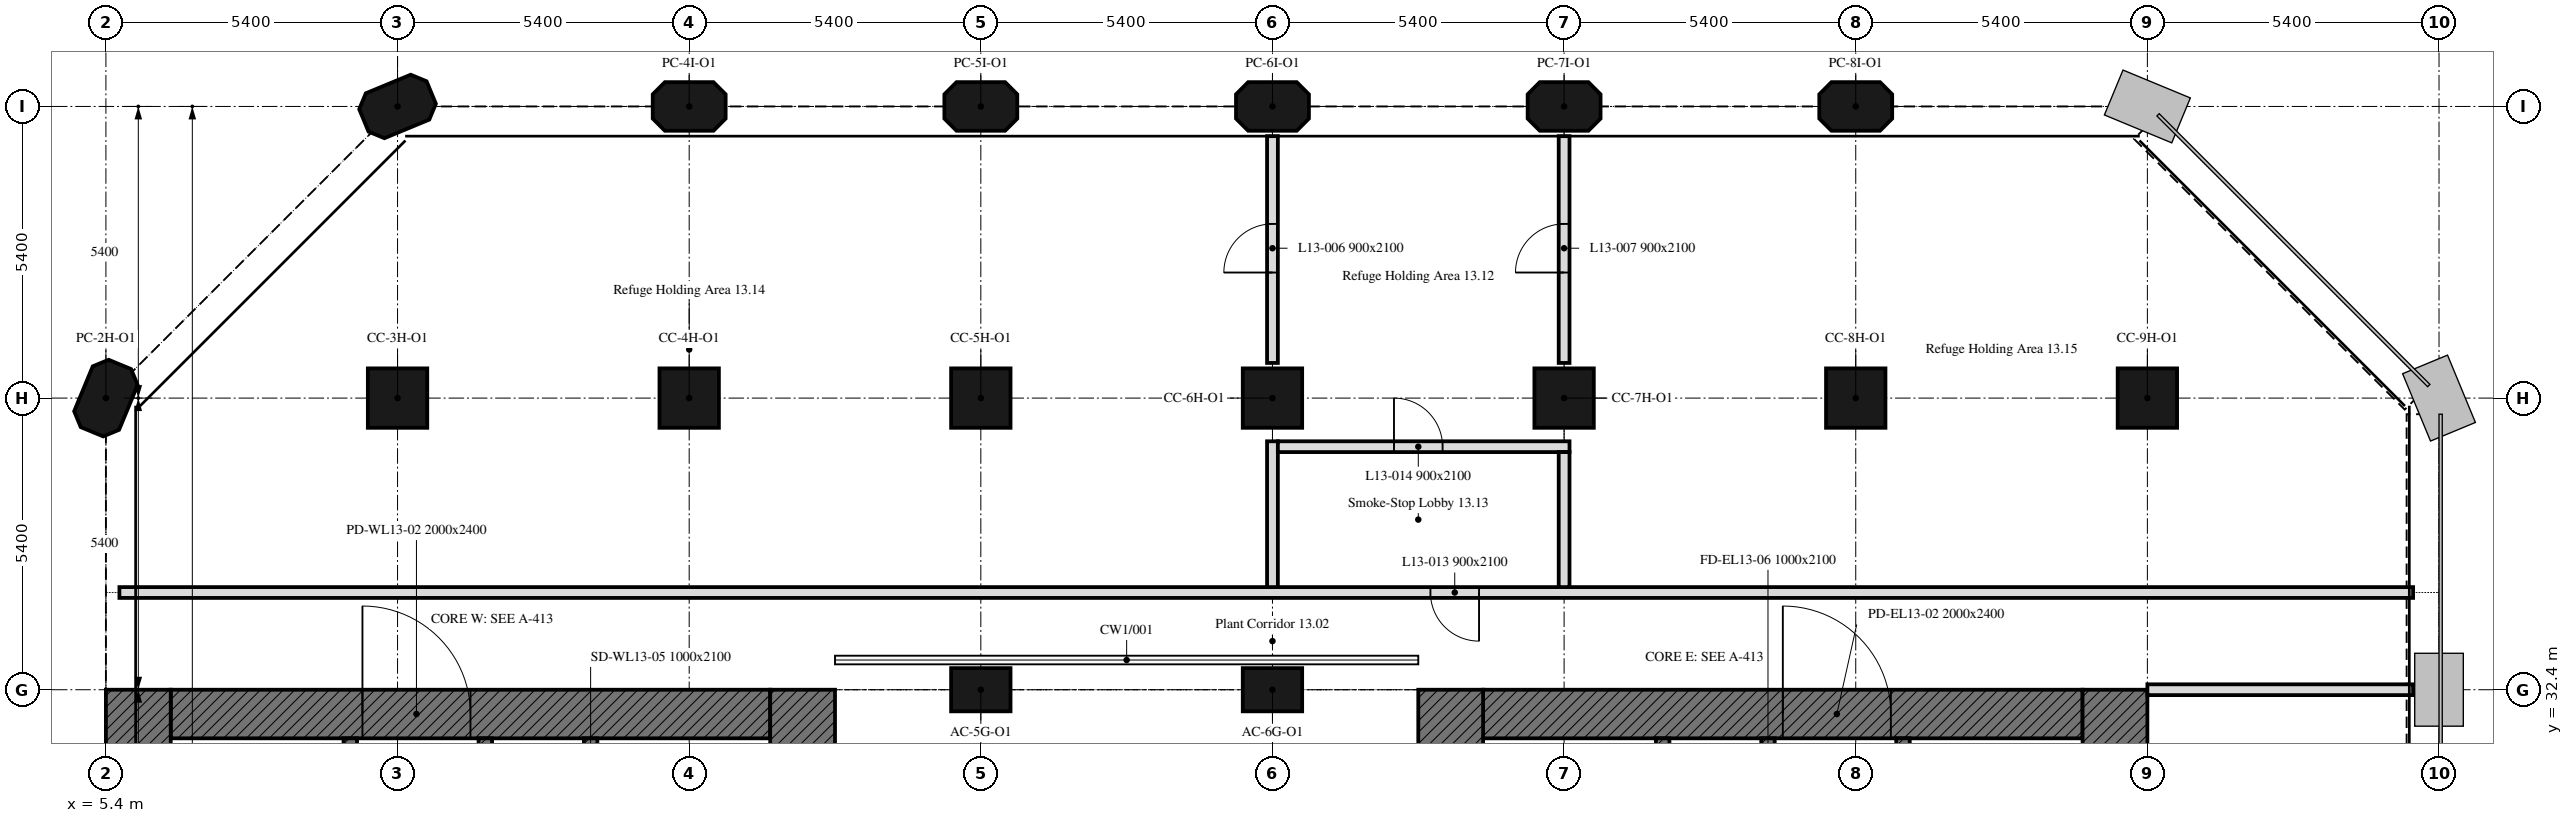
"""IFC4 building model, lengths in metres.
Left out: names, types, materials, properties, quantities, classifications, styles, units other than length and angle.
Written with IfcOpenShell. Run it as: python <this file> out.ifc"""

import sys

from ifc_helpers import new_model, si_unit, direction, frame, frame_2d, origin, origin_2d, place, context, subcontext, project, spatial, polyline, rectangle, outline, extrude, element, fill, save


model = new_model("IFC4")
c1 = context("Model", 3, precision=1e-05, world=origin(), true_north=direction((0.0, 1.0)))
c2 = subcontext(c1, "Body", "Model", "MODEL_VIEW")
j1 = project(units=[si_unit("LENGTHUNIT", "METRE"), si_unit("PLANEANGLEUNIT", "RADIAN")], contexts=[c1])
p1 = place(None, origin())
s1 = spatial("IfcSite", under=j1, at=p1, CompositionType="ELEMENT")
p2 = place(p1, origin())
s2 = spatial("IfcBuilding", under=s1, at=p2, CompositionType="ELEMENT")
p3 = place(p2, frame((0.0, 0.0, 60.2)))
s3 = spatial("IfcBuildingStorey", under=s2, at=p3, CompositionType="ELEMENT", Elevation=60.2)
for number, where, z_axis, x_axis in (
    (1, (21.6, 32.4, 0.0), (0.0, 0.0, 1.0), (1.0, 0.0, 0.0)),
    (2, (27.0, 32.4, 0.0), (0.0, 0.0, 1.0), (1.0, 0.0, 0.0)),
):
    element("IfcColumn", number, at=place(p3, frame(where, z_axis=z_axis, x_axis=x_axis)), inside=s3, PredefinedType="COLUMN", context=c2, shape_type="SweptSolid", body=[
        extrude(rectangle(XDim=1.1, YDim=0.8, at=origin_2d()), origin(), (0.0, 0.0, 1.0), 4.5),
    ])
p4 = place(p3, frame((5.4, 37.8, 0.0), z_axis=(0.0, 0.0, 1.0), x_axis=(0.382683432365, 0.923879532511, 0.0)))
e3 = element("IfcColumn", 3, at=p4, inside=s3, PredefinedType="COLUMN", context=c2, shape_type="SweptSolid", body=[
    extrude(outline(polyline([(-0.45, -0.45), (0.45, -0.45), (0.675, -0.225), (0.675, 0.225), (0.45, 0.45), (-0.45, 0.45), (-0.675, 0.225), (-0.675, -0.225), (-0.45, -0.45)])), origin(), (0.0, 0.0, 1.0), 4.5),
])
for number, where, z_axis, x_axis in (
    (4, (10.8, 37.8, 0.0), (0.0, 0.0, 1.0), (1.0, 0.0, 0.0)),
    (5, (16.2, 37.8, 0.0), (0.0, 0.0, 1.0), (1.0, 0.0, 0.0)),
    (6, (21.6, 37.8, 0.0), (0.0, 0.0, 1.0), (1.0, 0.0, 0.0)),
    (7, (27.0, 37.8, 0.0), (0.0, 0.0, 1.0), (1.0, 0.0, 0.0)),
    (8, (32.4, 37.8, 0.0), (0.0, 0.0, 1.0), (1.0, 0.0, 0.0)),
    (9, (37.8, 37.8, 0.0), (0.0, 0.0, 1.0), (1.0, 0.0, 0.0)),
    (10, (43.2, 37.8, 0.0), (0.0, 0.0, 1.0), (1.0, 0.0, 0.0)),
):
    element("IfcColumn", number, at=place(p3, frame(where, z_axis=z_axis, x_axis=x_axis)), inside=s3, PredefinedType="COLUMN", context=c2, shape_type="SweptSolid", body=[
        extrude(rectangle(XDim=1.1, YDim=1.1, at=origin_2d()), origin(), (0.0, 0.0, 1.0), 4.5),
    ])
for number, where, z_axis, x_axis in (
    (11, (10.8, 43.2, 0.0), (0.0, 0.0, 1.0), (0.924, 0.383, 0.0)),
    (12, (16.2, 43.2, 0.0), (0.0, 0.0, 1.0), (1.0, 0.0, 0.0)),
    (13, (21.6, 43.2, 0.0), (0.0, 0.0, 1.0), (1.0, 0.0, 0.0)),
    (14, (27.0, 43.2, 0.0), (0.0, 0.0, 1.0), (1.0, 0.0, 0.0)),
    (15, (32.4, 43.2, 0.0), (0.0, 0.0, 1.0), (1.0, 0.0, 0.0)),
    (16, (37.8, 43.2, 0.0), (0.0, 0.0, 1.0), (1.0, 0.0, 0.0)),
):
    element("IfcColumn", number, at=place(p3, frame(where, z_axis=z_axis, x_axis=x_axis)), inside=s3, PredefinedType="COLUMN", context=c2, shape_type="SweptSolid", body=[
        extrude(outline(polyline([(-0.45, -0.45), (0.45, -0.45), (0.675, -0.225), (0.675, 0.225), (0.45, 0.45), (-0.45, 0.45), (-0.675, 0.225), (-0.675, -0.225), (-0.45, -0.45)])), origin(), (0.0, 0.0, 1.0), 4.5),
    ])
p5 = place(p3, frame((6.6, 31.95, 0.0), z_axis=(0.0, 0.0, 1.0), x_axis=(1.0, 0.0, 0.0)))
e17 = element("IfcWall", 17, at=p5, inside=s3, PredefinedType="SOLIDWALL", context=c2, shape_type="SweptSolid", body=[
    extrude(rectangle(XDim=11.1, YDim=0.9, at=frame_2d((5.55, 0.0))), origin(), (0.0, 0.0, 1.0), 4.5),
])
p6 = place(p5, frame((3.55, 0.0, 0.0)))
e18 = element("IfcOpeningElement", 18, at=p6, cuts=e17, PredefinedType="OPENING", context=c2, shape_type="SweptSolid", body=[
    extrude(rectangle(XDim=2.0, YDim=2.4, at=frame_2d((1.0, 1.2))), frame((0.0, 0.45, 0.0), z_axis=(0.0, -1.0, 0.0), x_axis=(1.0, 0.0, 0.0)), (0.0, 0.0, 1.0), 0.9),
])
for number, where, z_axis, x_axis in (
    (19, (6.0, 16.2, 0.0), (0.0, 0.0, 1.0), (0.0, 1.0, 0.0)),
    (20, (18.3, 32.4, 0.0), (0.0, 0.0, 1.0), (0.0, -1.0, 0.0)),
):
    element("IfcWall", number, at=place(p3, frame(where, z_axis=z_axis, x_axis=x_axis)), inside=s3, PredefinedType="SOLIDWALL", context=c2, shape_type="SweptSolid", body=[
        extrude(rectangle(XDim=16.2, YDim=1.2, at=frame_2d((8.1, 0.0))), origin(), (0.0, 0.0, 1.0), 4.5),
    ])
p7 = place(p3, frame((9.925, 17.1, 0.0), z_axis=(0.0, 0.0, 1.0), x_axis=(0.0, 1.0, 0.0)))
e21 = element("IfcWall", 21, at=p7, inside=s3, PredefinedType="SOLIDWALL", context=c2, shape_type="SweptSolid", body=[
    extrude(rectangle(XDim=14.4, YDim=0.25, at=frame_2d((7.2, 0.0))), origin(), (0.0, 0.0, 1.0), 4.5),
])
p8 = place(p7, frame((4.6, 0.0, 0.0)))
e22 = element("IfcOpeningElement", 22, at=p8, cuts=e21, PredefinedType="OPENING", context=c2, shape_type="SweptSolid", body=[
    extrude(rectangle(XDim=1.0, YDim=2.1, at=frame_2d((0.5, 1.05))), frame((0.0, 0.125, 0.0), z_axis=(0.0, -1.0, 0.0), x_axis=(1.0, 0.0, 0.0)), (0.0, 0.0, 1.0), 0.25),
])
p9 = place(p7, frame((7.062, 0.0, 0.0)))
e23 = element("IfcOpeningElement", 23, at=p9, cuts=e21, PredefinedType="OPENING", context=c2, shape_type="SweptSolid", body=[
    extrude(rectangle(XDim=1.2, YDim=2.1, at=frame_2d((0.6, 1.05))), frame((0.0, 0.125, 0.0), z_axis=(0.0, -1.0, 0.0), x_axis=(1.0, 0.0, 0.0)), (0.0, 0.0, 1.0), 0.25),
])
p10 = place(p3, frame((14.375, 17.1, 0.0), z_axis=(0.0, 0.0, 1.0), x_axis=(0.0, 1.0, 0.0)))
e24 = element("IfcWall", 24, at=p10, inside=s3, PredefinedType="SOLIDWALL", context=c2, shape_type="SweptSolid", body=[
    extrude(rectangle(XDim=14.4, YDim=0.25, at=frame_2d((7.2, 0.0))), origin(), (0.0, 0.0, 1.0), 4.5),
])
p11 = place(p10, frame((13.15, 0.0, 0.0)))
e25 = element("IfcOpeningElement", 25, at=p11, cuts=e24, PredefinedType="OPENING", context=c2, shape_type="SweptSolid", body=[
    extrude(rectangle(XDim=1.0, YDim=2.1, at=frame_2d((0.5, 1.05))), frame((0.0, 0.125, 0.0), z_axis=(0.0, -1.0, 0.0), x_axis=(1.0, 0.0, 0.0)), (0.0, 0.0, 1.0), 0.25),
])
p12 = place(p10, frame((0.846, 0.0, 0.0)))
e26 = element("IfcOpeningElement", 26, at=p12, cuts=e24, PredefinedType="OPENING", context=c2, shape_type="SweptSolid", body=[
    extrude(rectangle(XDim=0.9, YDim=2.1, at=frame_2d((0.45, 1.05))), frame((0.0, 0.125, 0.0), z_axis=(0.0, -1.0, 0.0), x_axis=(1.0, 0.0, 0.0)), (0.0, 0.0, 1.0), 0.25),
])
p13 = place(p10, frame((3.346, 0.0, 0.0)))
e27 = element("IfcOpeningElement", 27, at=p13, cuts=e24, PredefinedType="OPENING", context=c2, shape_type="SweptSolid", body=[
    extrude(rectangle(XDim=0.9, YDim=2.1, at=frame_2d((0.45, 1.05))), frame((0.0, 0.125, 0.0), z_axis=(0.0, -1.0, 0.0), x_axis=(1.0, 0.0, 0.0)), (0.0, 0.0, 1.0), 0.25),
])
p14 = place(p3, frame((12.425, 29.4, 0.0), z_axis=(0.0, 0.0, 1.0), x_axis=(0.0, 1.0, 0.0)))
e28 = element("IfcWall", 28, at=p14, inside=s3, PredefinedType="SOLIDWALL", context=c2, shape_type="SweptSolid", body=[
    extrude(rectangle(XDim=2.1, YDim=0.25, at=frame_2d((1.05, 0.0))), origin(), (0.0, 0.0, 1.0), 4.5),
])
p15 = place(p14, frame((0.5, 0.0, 0.0)))
e29 = element("IfcOpeningElement", 29, at=p15, cuts=e28, PredefinedType="OPENING", context=c2, shape_type="SweptSolid", body=[
    extrude(rectangle(XDim=1.0, YDim=2.1, at=frame_2d((0.5, 1.05))), frame((0.0, 0.125, 0.0), z_axis=(0.0, -1.0, 0.0), x_axis=(1.0, 0.0, 0.0)), (0.0, 0.0, 1.0), 0.25),
])
p16 = place(p3, frame((30.9, 31.95, 0.0), z_axis=(0.0, 0.0, 1.0), x_axis=(1.0, 0.0, 0.0)))
e30 = element("IfcWall", 30, at=p16, inside=s3, PredefinedType="SOLIDWALL", context=c2, shape_type="SweptSolid", body=[
    extrude(rectangle(XDim=11.1, YDim=0.9, at=frame_2d((5.55, 0.0))), origin(), (0.0, 0.0, 1.0), 4.5),
])
p17 = place(p16, frame((5.55, 0.0, 0.0)))
e31 = element("IfcOpeningElement", 31, at=p17, cuts=e30, PredefinedType="OPENING", context=c2, shape_type="SweptSolid", body=[
    extrude(rectangle(XDim=2.0, YDim=2.4, at=frame_2d((1.0, 1.2))), frame((0.0, 0.45, 0.0), z_axis=(0.0, -1.0, 0.0), x_axis=(1.0, 0.0, 0.0)), (0.0, 0.0, 1.0), 0.9),
])
for number, where, z_axis, x_axis in (
    (32, (42.6, 32.4, 0.0), (0.0, 0.0, 1.0), (0.0, -1.0, 0.0)),
    (33, (30.3, 16.2, 0.0), (0.0, 0.0, 1.0), (0.0, 1.0, 0.0)),
):
    element("IfcWall", number, at=place(p3, frame(where, z_axis=z_axis, x_axis=x_axis)), inside=s3, PredefinedType="SOLIDWALL", context=c2, shape_type="SweptSolid", body=[
        extrude(rectangle(XDim=16.2, YDim=1.2, at=frame_2d((8.1, 0.0))), origin(), (0.0, 0.0, 1.0), 4.5),
    ])
p18 = place(p3, frame((38.675, 17.1, 0.0), z_axis=(0.0, 0.0, 1.0), x_axis=(0.0, 1.0, 0.0)))
e34 = element("IfcWall", 34, at=p18, inside=s3, PredefinedType="SOLIDWALL", context=c2, shape_type="SweptSolid", body=[
    extrude(rectangle(XDim=14.4, YDim=0.25, at=frame_2d((7.2, 0.0))), origin(), (0.0, 0.0, 1.0), 4.5),
])
p19 = place(p18, frame((4.6, 0.0, 0.0)))
e35 = element("IfcOpeningElement", 35, at=p19, cuts=e34, PredefinedType="OPENING", context=c2, shape_type="SweptSolid", body=[
    extrude(rectangle(XDim=1.0, YDim=2.1, at=frame_2d((0.5, 1.05))), frame((0.0, 0.125, 0.0), z_axis=(0.0, -1.0, 0.0), x_axis=(1.0, 0.0, 0.0)), (0.0, 0.0, 1.0), 0.25),
])
p20 = place(p18, frame((7.062, 0.0, 0.0)))
e36 = element("IfcOpeningElement", 36, at=p20, cuts=e34, PredefinedType="OPENING", context=c2, shape_type="SweptSolid", body=[
    extrude(rectangle(XDim=1.2, YDim=2.1, at=frame_2d((0.6, 1.05))), frame((0.0, 0.125, 0.0), z_axis=(0.0, -1.0, 0.0), x_axis=(1.0, 0.0, 0.0)), (0.0, 0.0, 1.0), 0.25),
])
p21 = place(p3, frame((34.225, 17.1, 0.0), z_axis=(0.0, 0.0, 1.0), x_axis=(0.0, 1.0, 0.0)))
e37 = element("IfcWall", 37, at=p21, inside=s3, PredefinedType="SOLIDWALL", context=c2, shape_type="SweptSolid", body=[
    extrude(rectangle(XDim=14.4, YDim=0.25, at=frame_2d((7.2, 0.0))), origin(), (0.0, 0.0, 1.0), 4.5),
])
p22 = place(p21, frame((13.15, 0.0, 0.0)))
e38 = element("IfcOpeningElement", 38, at=p22, cuts=e37, PredefinedType="OPENING", context=c2, shape_type="SweptSolid", body=[
    extrude(rectangle(XDim=1.0, YDim=2.1, at=frame_2d((0.5, 1.05))), frame((0.0, 0.125, 0.0), z_axis=(0.0, -1.0, 0.0), x_axis=(1.0, 0.0, 0.0)), (0.0, 0.0, 1.0), 0.25),
])
p23 = place(p21, frame((0.846, 0.0, 0.0)))
e39 = element("IfcOpeningElement", 39, at=p23, cuts=e37, PredefinedType="OPENING", context=c2, shape_type="SweptSolid", body=[
    extrude(rectangle(XDim=0.9, YDim=2.1, at=frame_2d((0.45, 1.05))), frame((0.0, 0.125, 0.0), z_axis=(0.0, -1.0, 0.0), x_axis=(1.0, 0.0, 0.0)), (0.0, 0.0, 1.0), 0.25),
])
p24 = place(p21, frame((3.346, 0.0, 0.0)))
e40 = element("IfcOpeningElement", 40, at=p24, cuts=e37, PredefinedType="OPENING", context=c2, shape_type="SweptSolid", body=[
    extrude(rectangle(XDim=0.9, YDim=2.1, at=frame_2d((0.45, 1.05))), frame((0.0, 0.125, 0.0), z_axis=(0.0, -1.0, 0.0), x_axis=(1.0, 0.0, 0.0)), (0.0, 0.0, 1.0), 0.25),
])
p25 = place(p3, frame((36.175, 29.4, 0.0), z_axis=(0.0, 0.0, 1.0), x_axis=(0.0, 1.0, 0.0)))
e41 = element("IfcWall", 41, at=p25, inside=s3, PredefinedType="SOLIDWALL", context=c2, shape_type="SweptSolid", body=[
    extrude(rectangle(XDim=2.1, YDim=0.25, at=frame_2d((1.05, 0.0))), origin(), (0.0, 0.0, 1.0), 4.5),
])
p26 = place(p25, frame((0.5, 0.0, 0.0)))
e42 = element("IfcOpeningElement", 42, at=p26, cuts=e41, PredefinedType="OPENING", context=c2, shape_type="SweptSolid", body=[
    extrude(rectangle(XDim=1.0, YDim=2.1, at=frame_2d((0.5, 1.05))), frame((0.0, 0.125, 0.0), z_axis=(0.0, -1.0, 0.0), x_axis=(1.0, 0.0, 0.0)), (0.0, 0.0, 1.0), 0.25),
])
p27 = place(p3, frame((48.12, 34.2, 0.0), z_axis=(0.0, 0.0, 1.0), x_axis=(-1.0, 0.0, 0.0)))
e43 = element("IfcWall", 43, at=p27, inside=s3, PredefinedType="PARTITIONING", context=c2, shape_type="SweptSolid", body=[
    extrude(rectangle(XDim=42.47, YDim=0.2, at=frame_2d((21.235, 0.0))), origin(), (0.0, 0.0, 1.0), 3.75),
])
p28 = place(p27, frame((17.295, 0.0, 0.0)))
e44 = element("IfcOpeningElement", 44, at=p28, cuts=e43, PredefinedType="OPENING", context=c2, shape_type="SweptSolid", body=[
    extrude(rectangle(XDim=0.9, YDim=2.1, at=frame_2d((0.45, 1.05))), frame((0.0, 0.1, 0.0), z_axis=(0.0, -1.0, 0.0), x_axis=(1.0, 0.0, 0.0)), (0.0, 0.0, 1.0), 0.2),
])
p29 = place(p3, frame((43.2, 32.4, 0.0), z_axis=(0.0, 0.0, 1.0), x_axis=(1.0, 0.0, 0.0)))
e45 = element("IfcWall", 45, at=p29, inside=s3, PredefinedType="PARTITIONING", context=c2, shape_type="SweptSolid", body=[
    extrude(rectangle(XDim=4.92, YDim=0.2, at=frame_2d((2.46, 0.0))), origin(), (0.0, 0.0, 1.0), 3.75),
])
p30 = place(p3, frame((27.0, 34.3, 0.0), z_axis=(0.0, 0.0, 1.0), x_axis=(0.0, 1.0, 0.0)))
e46 = element("IfcWall", 46, at=p30, inside=s3, PredefinedType="PARTITIONING", context=c2, shape_type="SweptSolid", body=[
    extrude(rectangle(XDim=2.7, YDim=0.2, at=frame_2d((1.35, 0.0))), origin(), (0.0, 0.0, 1.0), 3.75),
])
p31 = place(p3, frame((27.0, 38.451, 0.0), z_axis=(0.0, 0.0, 1.0), x_axis=(0.0, 1.0, 0.0)))
e47 = element("IfcWall", 47, at=p31, inside=s3, PredefinedType="PARTITIONING", context=c2, shape_type="SweptSolid", body=[
    extrude(rectangle(XDim=4.199, YDim=0.2, at=frame_2d((2.1, 0.0))), origin(), (0.0, 0.0, 1.0), 3.75),
])
p32 = place(p31, frame((1.674, 0.0, 0.0)))
e48 = element("IfcOpeningElement", 48, at=p32, cuts=e47, PredefinedType="OPENING", context=c2, shape_type="SweptSolid", body=[
    extrude(rectangle(XDim=0.9, YDim=2.1, at=frame_2d((0.45, 1.05))), frame((0.0, 0.1, 0.0), z_axis=(0.0, -1.0, 0.0), x_axis=(1.0, 0.0, 0.0)), (0.0, 0.0, 1.0), 0.2),
])
p33 = place(p3, frame((32.4, 38.451, 0.0), z_axis=(0.0, 0.0, 1.0), x_axis=(0.0, 1.0, 0.0)))
e49 = element("IfcWall", 49, at=p33, inside=s3, PredefinedType="PARTITIONING", context=c2, shape_type="SweptSolid", body=[
    extrude(rectangle(XDim=4.199, YDim=0.2, at=frame_2d((2.1, 0.0))), origin(), (0.0, 0.0, 1.0), 3.75),
])
p34 = place(p33, frame((1.674, 0.0, 0.0)))
e50 = element("IfcOpeningElement", 50, at=p34, cuts=e49, PredefinedType="OPENING", context=c2, shape_type="SweptSolid", body=[
    extrude(rectangle(XDim=0.9, YDim=2.1, at=frame_2d((0.45, 1.05))), frame((0.0, 0.1, 0.0), z_axis=(0.0, -1.0, 0.0), x_axis=(1.0, 0.0, 0.0)), (0.0, 0.0, 1.0), 0.2),
])
p35 = place(p3, frame((27.1, 36.9, 0.0), z_axis=(0.0, 0.0, 1.0), x_axis=(1.0, 0.0, 0.0)))
e51 = element("IfcWall", 51, at=p35, inside=s3, PredefinedType="PARTITIONING", context=c2, shape_type="SweptSolid", body=[
    extrude(rectangle(XDim=5.4, YDim=0.2, at=frame_2d((2.7, 0.0))), origin(), (0.0, 0.0, 1.0), 3.75),
])
p36 = place(p35, frame((2.15, 0.0, 0.0)))
e52 = element("IfcOpeningElement", 52, at=p36, cuts=e51, PredefinedType="OPENING", context=c2, shape_type="SweptSolid", body=[
    extrude(rectangle(XDim=0.9, YDim=2.1, at=frame_2d((0.45, 1.05))), frame((0.0, 0.1, 0.0), z_axis=(0.0, -1.0, 0.0), x_axis=(1.0, 0.0, 0.0)), (0.0, 0.0, 1.0), 0.2),
])
p37 = place(p3, frame((32.4, 36.8, 0.0), z_axis=(0.0, 0.0, 1.0), x_axis=(0.0, -1.0, 0.0)))
e53 = element("IfcWall", 53, at=p37, inside=s3, PredefinedType="PARTITIONING", context=c2, shape_type="SweptSolid", body=[
    extrude(rectangle(XDim=2.5, YDim=0.2, at=frame_2d((1.25, 0.0))), origin(), (0.0, 0.0, 1.0), 3.75),
])
p38 = place(p6, origin())
e54 = element("IfcDoor", 54, at=p38, inside=s3, OperationType="DOUBLE_DOOR_SINGLE_SWING", PredefinedType="DOOR", context=c2, shape_type="SweptSolid", body=[
    extrude(rectangle(XDim=2.0, YDim=2.4, at=frame_2d((1.0, 1.2))), frame((0.0, 0.025, 0.0), z_axis=(0.0, -1.0, 0.0), x_axis=(1.0, 0.0, 0.0)), (0.0, 0.0, 1.0), 0.05),
])
fill(e18, e54)
p39 = place(p17, origin())
e55 = element("IfcDoor", 55, at=p39, inside=s3, OperationType="DOUBLE_DOOR_SINGLE_SWING", PredefinedType="DOOR", context=c2, shape_type="SweptSolid", body=[
    extrude(rectangle(XDim=2.0, YDim=2.4, at=frame_2d((1.0, 1.2))), frame((0.0, 0.025, 0.0), z_axis=(0.0, -1.0, 0.0), x_axis=(1.0, 0.0, 0.0)), (0.0, 0.0, 1.0), 0.05),
])
fill(e31, e55)
p40 = place(p32, origin())
e56 = element("IfcDoor", 56, at=p40, inside=s3, OperationType="SINGLE_SWING_RIGHT", PredefinedType="DOOR", context=c2, shape_type="SweptSolid", body=[
    extrude(rectangle(XDim=0.9, YDim=2.1, at=frame_2d((0.45, 1.05))), frame((0.0, 0.025, 0.0), z_axis=(0.0, -1.0, 0.0), x_axis=(1.0, 0.0, 0.0)), (0.0, 0.0, 1.0), 0.05),
])
fill(e48, e56)
p41 = place(p34, origin())
e57 = element("IfcDoor", 57, at=p41, inside=s3, OperationType="SINGLE_SWING_LEFT", PredefinedType="DOOR", context=c2, shape_type="SweptSolid", body=[
    extrude(rectangle(XDim=0.9, YDim=2.1, at=frame_2d((0.45, 1.05))), frame((0.0, 0.025, 0.0), z_axis=(0.0, -1.0, 0.0), x_axis=(1.0, 0.0, 0.0)), (0.0, 0.0, 1.0), 0.05),
])
fill(e50, e57)
p42 = place(p28, origin())
e58 = element("IfcDoor", 58, at=p42, inside=s3, OperationType="SINGLE_SWING_RIGHT", PredefinedType="DOOR", context=c2, shape_type="SweptSolid", body=[
    extrude(rectangle(XDim=0.9, YDim=2.1, at=frame_2d((0.45, 1.05))), frame((0.0, 0.025, 0.0), z_axis=(0.0, -1.0, 0.0), x_axis=(1.0, 0.0, 0.0)), (0.0, 0.0, 1.0), 0.05),
])
fill(e44, e58)
p43 = place(p36, origin())
e59 = element("IfcDoor", 59, at=p43, inside=s3, OperationType="SINGLE_SWING_RIGHT", PredefinedType="DOOR", context=c2, shape_type="SweptSolid", body=[
    extrude(rectangle(XDim=0.9, YDim=2.1, at=frame_2d((0.45, 1.05))), frame((0.0, 0.025, 0.0), z_axis=(0.0, -1.0, 0.0), x_axis=(1.0, 0.0, 0.0)), (0.0, 0.0, 1.0), 0.05),
])
fill(e52, e59)
save(model, sys.argv[1])
